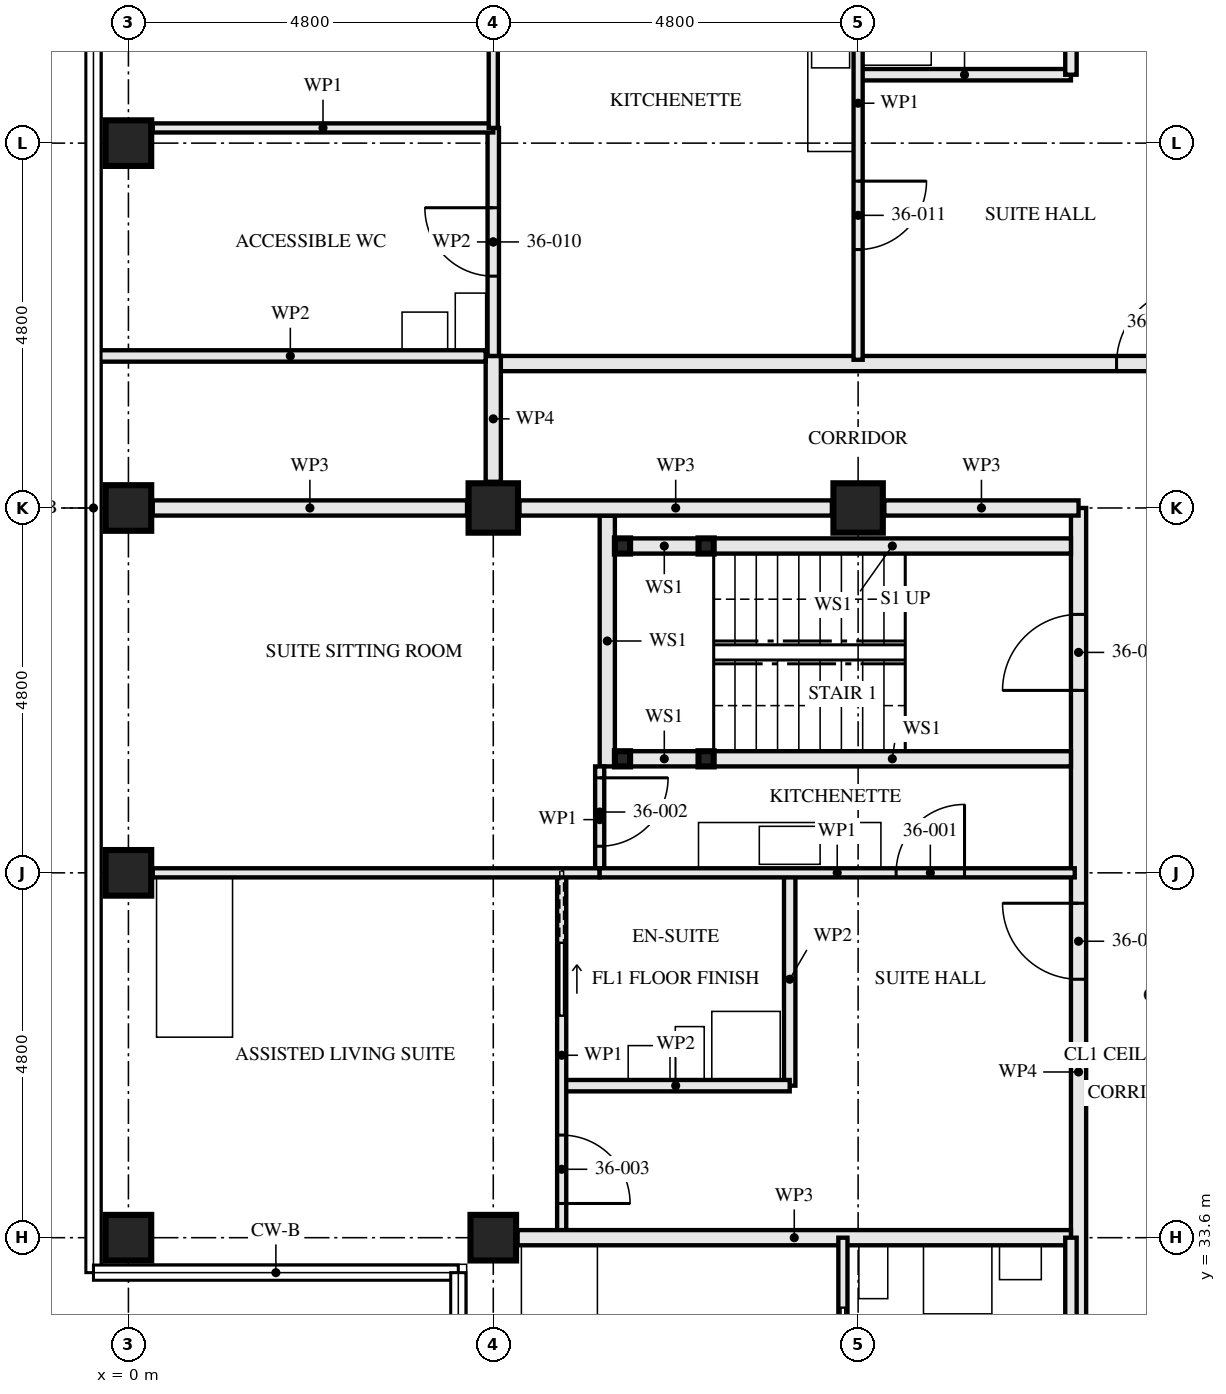
"""IFC4 building model, lengths in metres.
Left out: names, types, materials, properties, quantities, classifications, styles, units other than length and angle.
Written with IfcOpenShell. Run it as: python <this file> out.ifc"""

import sys

from ifc_helpers import new_model, si_unit, direction, frame, frame_2d, origin, origin_2d, place, context, subcontext, project, spatial, rectangle, hollow_rectangle, extrude, element, fill, save


model = new_model("IFC4")
c1 = context("Model", 3, precision=1e-05, world=origin(), true_north=direction((0.0, 1.0)))
c2 = subcontext(c1, "Body", "Model", "MODEL_VIEW")
j1 = project(units=[si_unit("LENGTHUNIT", "METRE"), si_unit("PLANEANGLEUNIT", "RADIAN")], contexts=[c1])
p1 = place(None, origin())
s1 = spatial("IfcSite", under=j1, at=p1, CompositionType="ELEMENT")
p2 = place(p1, origin())
s2 = spatial("IfcBuilding", under=s1, at=p2, CompositionType="ELEMENT")
p3 = place(p2, frame((0.0, 0.0, 133.0)))
s3 = spatial("IfcBuildingStorey", under=s2, at=p3, CompositionType="ELEMENT", Elevation=133.0)
for number, where, z_axis, x_axis in (
    (1, (0.0, 33.6, 0.0), (0.0, 0.0, 1.0), (0.0, 1.0, 0.0)),
    (2, (0.0, 38.4, 0.0), (0.0, 0.0, 1.0), (1.0, 0.0, 0.0)),
    (3, (0.0, 43.2, 0.0), (0.0, 0.0, 1.0), (0.0, 1.0, 0.0)),
    (4, (0.0, 48.0, 0.0), (0.0, 0.0, 1.0), (1.0, 0.0, 0.0)),
    (5, (4.8, 33.6, 0.0), (0.0, 0.0, 1.0), (0.0, 1.0, 0.0)),
):
    element("IfcColumn", number, at=place(p3, frame(where, z_axis=z_axis, x_axis=x_axis)), inside=s3, PredefinedType="COLUMN", context=c2, shape_type="SweptSolid", body=[
        extrude(hollow_rectangle(XDim=0.6, YDim=0.6, WallThickness=0.08, at=origin_2d()), origin(), (0.0, 0.0, 1.0), 3.5),
    ])
for number, where, z_axis, x_axis in (
    (6, (4.8, 43.2, 0.0), (0.0, 0.0, 1.0), (0.0, 1.0, 0.0)),
    (7, (9.6, 43.2, 0.0), (0.0, 0.0, 1.0), (0.0, 1.0, 0.0)),
):
    element("IfcColumn", number, at=place(p3, frame(where, z_axis=z_axis, x_axis=x_axis)), inside=s3, PredefinedType="COLUMN", context=c2, shape_type="SweptSolid", body=[
        extrude(hollow_rectangle(XDim=0.65, YDim=0.65, WallThickness=0.05, at=origin_2d()), origin(), (0.0, 0.0, 1.0), 3.5),
    ])
for number, where, z_axis, x_axis in (
    (8, (6.5, 42.7, 0.0), (0.0, 0.0, 1.0), (1.0, 0.0, 0.0)),
    (9, (6.5, 39.9, 0.0), (0.0, 0.0, 1.0), (1.0, 0.0, 0.0)),
    (10, (7.6, 42.7, 0.0), (0.0, 0.0, 1.0), (1.0, 0.0, 0.0)),
    (11, (7.6, 39.9, 0.0), (0.0, 0.0, 1.0), (1.0, 0.0, 0.0)),
):
    element("IfcColumn", number, at=place(p3, frame(where, z_axis=z_axis, x_axis=x_axis)), inside=s3, PredefinedType="COLUMN", context=c2, shape_type="SweptSolid", body=[
        extrude(hollow_rectangle(XDim=0.2, YDim=0.2, WallThickness=0.008, at=origin_2d()), origin(), (0.0, 0.0, 1.0), 3.25),
    ])
p4 = place(p3, frame((6.6, 42.7, 0.0), z_axis=(0.0, 0.0, 1.0), x_axis=(1.0, 0.0, 0.0)))
e12 = element("IfcWall", 12, at=p4, inside=s3, PredefinedType="SOLIDWALL", context=c2, shape_type="SweptSolid", body=[
    extrude(rectangle(XDim=0.9, YDim=0.2, at=frame_2d((0.45, 0.0))), origin(), (0.0, 0.0, 1.0), 2.94),
])
p5 = place(p3, frame((7.7, 42.7, 0.0), z_axis=(0.0, 0.0, 1.0), x_axis=(1.0, 0.0, 0.0)))
e13 = element("IfcWall", 13, at=p5, inside=s3, PredefinedType="SOLIDWALL", context=c2, shape_type="SweptSolid", body=[
    extrude(rectangle(XDim=4.7, YDim=0.2, at=frame_2d((2.35, 0.0))), origin(), (0.0, 0.0, 1.0), 2.94),
])
p6 = place(p3, frame((6.6, 39.9, 0.0), z_axis=(0.0, 0.0, 1.0), x_axis=(1.0, 0.0, 0.0)))
e14 = element("IfcWall", 14, at=p6, inside=s3, PredefinedType="SOLIDWALL", context=c2, shape_type="SweptSolid", body=[
    extrude(rectangle(XDim=0.9, YDim=0.2, at=frame_2d((0.45, 0.0))), origin(), (0.0, 0.0, 1.0), 2.94),
])
p7 = place(p3, frame((7.7, 39.9, 0.0), z_axis=(0.0, 0.0, 1.0), x_axis=(1.0, 0.0, 0.0)))
e15 = element("IfcWall", 15, at=p7, inside=s3, PredefinedType="SOLIDWALL", context=c2, shape_type="SweptSolid", body=[
    extrude(rectangle(XDim=4.7, YDim=0.2, at=frame_2d((2.35, 0.0))), origin(), (0.0, 0.0, 1.0), 2.94),
])
p8 = place(p3, frame((6.3, 43.1, 0.0), z_axis=(0.0, 0.0, 1.0), x_axis=(0.0, -1.0, 0.0)))
e16 = element("IfcWall", 16, at=p8, inside=s3, PredefinedType="SOLIDWALL", context=c2, shape_type="SweptSolid", body=[
    extrude(rectangle(XDim=3.3, YDim=0.2, at=frame_2d((1.65, 0.0))), origin(), (0.0, 0.0, 1.0), 3.25),
])
p9 = place(p3, frame((5.7, 35.6, 0.0), z_axis=(0.0, 0.0, 1.0), x_axis=(1.0, 0.0, 0.0)))
e17 = element("IfcWall", 17, at=p9, inside=s3, PredefinedType="PARTITIONING", context=c2, shape_type="SweptSolid", body=[
    extrude(rectangle(XDim=3.0, YDim=0.15, at=frame_2d((1.5, 0.0))), origin(), (0.0, 0.0, 1.0), 3.25),
])
p10 = place(p3, frame((8.7, 38.4, 0.0), z_axis=(0.0, 0.0, 1.0), x_axis=(0.0, -1.0, 0.0)))
e18 = element("IfcWall", 18, at=p10, inside=s3, PredefinedType="PARTITIONING", context=c2, shape_type="SweptSolid", body=[
    extrude(rectangle(XDim=2.8, YDim=0.15, at=frame_2d((1.4, 0.0))), origin(), (0.0, 0.0, 1.0), 3.25),
])
p11 = place(p3, frame((6.2, 38.4, 0.0), z_axis=(0.0, 0.0, 1.0), x_axis=(1.0, 0.0, 0.0)))
e19 = element("IfcWall", 19, at=p11, inside=s3, PredefinedType="PARTITIONING", context=c2, shape_type="SweptSolid", body=[
    extrude(rectangle(XDim=6.25, YDim=0.12, at=frame_2d((3.125, 0.0))), origin(), (0.0, 0.0, 1.0), 2.04),
])
p12 = place(p11, frame((3.9, 0.0, 0.0)))
e20 = element("IfcOpeningElement", 20, at=p12, cuts=e19, PredefinedType="OPENING", context=c2, shape_type="SweptSolid", body=[
    extrude(rectangle(XDim=0.9, YDim=2.0, at=frame_2d((0.45, 1.0))), frame((0.0, 0.071, 0.0), z_axis=(0.0, -1.0, 0.0), x_axis=(1.0, 0.0, 0.0)), (0.0, 0.0, 1.0), 0.141),
])
p13 = place(p3, frame((6.2, 39.8, 0.0), z_axis=(0.0, 0.0, 1.0), x_axis=(0.0, -1.0, 0.0)))
e21 = element("IfcWall", 21, at=p13, inside=s3, PredefinedType="PARTITIONING", context=c2, shape_type="SweptSolid", body=[
    extrude(rectangle(XDim=1.4, YDim=0.12, at=frame_2d((0.7, 0.0))), origin(), (0.0, 0.0, 1.0), 3.25),
])
p14 = place(p13, frame((0.15, 0.0, 0.0)))
e22 = element("IfcOpeningElement", 22, at=p14, cuts=e21, PredefinedType="OPENING", context=c2, shape_type="SweptSolid", body=[
    extrude(rectangle(XDim=0.9, YDim=2.1, at=frame_2d((0.45, 1.05))), frame((0.0, 0.071, 0.0), z_axis=(0.0, -1.0, 0.0), x_axis=(1.0, 0.0, 0.0)), (0.0, 0.0, 1.0), 0.141),
])
p15 = place(p3, frame((5.7, 38.4, 0.0), z_axis=(0.0, 0.0, 1.0), x_axis=(0.0, -1.0, 0.0)))
e23 = element("IfcWall", 23, at=p15, inside=s3, PredefinedType="PARTITIONING", context=c2, shape_type="SweptSolid", body=[
    extrude(rectangle(XDim=4.8, YDim=0.12, at=frame_2d((2.4, 0.0))), origin(), (0.0, 0.0, 1.0), 3.25),
])
p16 = place(p15, frame((3.45, 0.0, 0.0)))
e24 = element("IfcOpeningElement", 24, at=p16, cuts=e23, PredefinedType="OPENING", context=c2, shape_type="SweptSolid", body=[
    extrude(rectangle(XDim=0.9, YDim=2.1, at=frame_2d((0.45, 1.05))), frame((0.0, 0.071, 0.0), z_axis=(0.0, -1.0, 0.0), x_axis=(1.0, 0.0, 0.0)), (0.0, 0.0, 1.0), 0.141),
])
p17 = place(p15, frame((0.925, 0.0, 0.0)))
e25 = element("IfcOpeningElement", 25, at=p17, cuts=e23, PredefinedType="OPENING", context=c2, shape_type="SweptSolid", body=[
    extrude(rectangle(XDim=0.95, YDim=2.1, at=frame_2d((0.475, 1.05))), frame((0.0, 0.071, 0.0), z_axis=(0.0, -1.0, 0.0), x_axis=(1.0, 0.0, 0.0)), (0.0, 0.0, 1.0), 0.141),
])
p18 = place(p3, frame((0.32, 38.4, 0.0), z_axis=(0.0, 0.0, 1.0), x_axis=(1.0, 0.0, 0.0)))
e26 = element("IfcWall", 26, at=p18, inside=s3, PredefinedType="PARTITIONING", context=c2, shape_type="SweptSolid", body=[
    extrude(rectangle(XDim=5.88, YDim=0.12, at=frame_2d((2.94, 0.0))), origin(), (0.0, 0.0, 1.0), 2.04),
])
p19 = place(p3, frame((5.12, 33.6, 0.0), z_axis=(0.0, 0.0, 1.0), x_axis=(1.0, 0.0, 0.0)))
e27 = element("IfcWall", 27, at=p19, inside=s3, PredefinedType="PARTITIONING", context=c2, shape_type="SweptSolid", body=[
    extrude(rectangle(XDim=7.28, YDim=0.2, at=frame_2d((3.64, 0.0))), origin(), (0.0, 0.0, 1.0), 2.24),
])
p20 = place(p3, frame((12.4, 33.6, 0.0), z_axis=(0.0, 0.0, 1.0), x_axis=(0.0, -1.0, 0.0)))
e28 = element("IfcWall", 28, at=p20, inside=s3, PredefinedType="PARTITIONING", context=c2, shape_type="SweptSolid", body=[
    extrude(rectangle(XDim=2.8, YDim=0.15, at=frame_2d((1.4, 0.0))), origin(), (0.0, 0.0, 1.0), 3.25),
])
p21 = place(p3, frame((9.4, 33.6, 0.0), z_axis=(0.0, 0.0, 1.0), x_axis=(0.0, -1.0, 0.0)))
e29 = element("IfcWall", 29, at=p21, inside=s3, PredefinedType="PARTITIONING", context=c2, shape_type="SweptSolid", body=[
    extrude(rectangle(XDim=4.48, YDim=0.12, at=frame_2d((2.24, 0.0))), origin(), (0.0, 0.0, 1.0), 3.25),
])
p22 = place(p21, frame((2.975, 0.0, 0.0)))
e30 = element("IfcOpeningElement", 30, at=p22, cuts=e29, PredefinedType="OPENING", context=c2, shape_type="SweptSolid", body=[
    extrude(rectangle(XDim=0.9, YDim=2.1, at=frame_2d((0.45, 1.05))), frame((0.0, 0.071, 0.0), z_axis=(0.0, -1.0, 0.0), x_axis=(1.0, 0.0, 0.0)), (0.0, 0.0, 1.0), 0.141),
])
p23 = place(p21, frame((0.925, 0.0, 0.0)))
e31 = element("IfcOpeningElement", 31, at=p23, cuts=e29, PredefinedType="OPENING", context=c2, shape_type="SweptSolid", body=[
    extrude(rectangle(XDim=0.95, YDim=2.1, at=frame_2d((0.475, 1.05))), frame((0.0, 0.071, 0.0), z_axis=(0.0, -1.0, 0.0), x_axis=(1.0, 0.0, 0.0)), (0.0, 0.0, 1.0), 0.141),
])
p24 = place(p3, frame((12.5, 43.2, 0.0), z_axis=(0.0, 0.0, 1.0), x_axis=(0.0, -1.0, 0.0)))
e32 = element("IfcWall", 32, at=p24, inside=s3, PredefinedType="PARTITIONING", context=c2, shape_type="SweptSolid", body=[
    extrude(rectangle(XDim=14.84, YDim=0.2, at=frame_2d((7.42, 0.0))), origin(), (0.0, 0.0, 1.0), 2.04),
])
p25 = place(p24, frame((1.4, 0.0, 0.0)))
e33 = element("IfcOpeningElement", 33, at=p25, cuts=e32, PredefinedType="OPENING", context=c2, shape_type="SweptSolid", body=[
    extrude(rectangle(XDim=1.0, YDim=2.0, at=frame_2d((0.5, 1.0))), frame((0.0, 0.111, 0.0), z_axis=(0.0, -1.0, 0.0), x_axis=(1.0, 0.0, 0.0)), (0.0, 0.0, 1.0), 0.221),
])
p26 = place(p24, frame((5.2, 0.0, 0.0)))
e34 = element("IfcOpeningElement", 34, at=p26, cuts=e32, PredefinedType="OPENING", context=c2, shape_type="SweptSolid", body=[
    extrude(rectangle(XDim=1.0, YDim=2.0, at=frame_2d((0.5, 1.0))), frame((0.0, 0.111, 0.0), z_axis=(0.0, -1.0, 0.0), x_axis=(1.0, 0.0, 0.0)), (0.0, 0.0, 1.0), 0.221),
])
p27 = place(p24, frame((13.0, 0.0, 0.0)))
e35 = element("IfcOpeningElement", 35, at=p27, cuts=e32, PredefinedType="OPENING", context=c2, shape_type="SweptSolid", body=[
    extrude(rectangle(XDim=1.0, YDim=2.0, at=frame_2d((0.5, 1.0))), frame((0.0, 0.111, 0.0), z_axis=(0.0, -1.0, 0.0), x_axis=(1.0, 0.0, 0.0)), (0.0, 0.0, 1.0), 0.221),
])
p28 = place(p3, frame((12.4, 51.9, 0.0), z_axis=(0.0, 0.0, 1.0), x_axis=(0.0, -1.0, 0.0)))
e36 = element("IfcWall", 36, at=p28, inside=s3, PredefinedType="PARTITIONING", context=c2, shape_type="SweptSolid", body=[
    extrude(rectangle(XDim=3.0, YDim=0.15, at=frame_2d((1.5, 0.0))), origin(), (0.0, 0.0, 1.0), 3.25),
])
p29 = place(p3, frame((12.4, 48.9, 0.0), z_axis=(0.0, 0.0, 1.0), x_axis=(-1.0, 0.0, 0.0)))
e37 = element("IfcWall", 37, at=p29, inside=s3, PredefinedType="PARTITIONING", context=c2, shape_type="SweptSolid", body=[
    extrude(rectangle(XDim=2.8, YDim=0.15, at=frame_2d((1.4, 0.0))), origin(), (0.0, 0.0, 1.0), 3.25),
])
p30 = place(p3, frame((4.8, 48.2, 0.0), z_axis=(0.0, 0.0, 1.0), x_axis=(0.0, -1.0, 0.0)))
e38 = element("IfcWall", 38, at=p30, inside=s3, PredefinedType="PARTITIONING", context=c2, shape_type="SweptSolid", body=[
    extrude(rectangle(XDim=3.0, YDim=0.15, at=frame_2d((1.5, 0.0))), origin(), (0.0, 0.0, 1.0), 2.04),
])
p31 = place(p30, frame((1.05, 0.0, 0.0)))
e39 = element("IfcOpeningElement", 39, at=p31, cuts=e38, PredefinedType="OPENING", context=c2, shape_type="SweptSolid", body=[
    extrude(rectangle(XDim=0.9, YDim=2.0, at=frame_2d((0.45, 1.0))), frame((0.0, 0.085, 0.0), z_axis=(0.0, -1.0, 0.0), x_axis=(1.0, 0.0, 0.0)), (0.0, 0.0, 1.0), 0.171),
])
p32 = place(p3, frame((9.6, 51.9, 0.0), z_axis=(0.0, 0.0, 1.0), x_axis=(0.0, -1.0, 0.0)))
e40 = element("IfcWall", 40, at=p32, inside=s3, PredefinedType="PARTITIONING", context=c2, shape_type="SweptSolid", body=[
    extrude(rectangle(XDim=6.75, YDim=0.12, at=frame_2d((3.375, 0.0))), origin(), (0.0, 0.0, 1.0), 2.04),
])
p33 = place(p32, frame((4.4, 0.0, 0.0)))
e41 = element("IfcOpeningElement", 41, at=p33, cuts=e40, PredefinedType="OPENING", context=c2, shape_type="SweptSolid", body=[
    extrude(rectangle(XDim=0.9, YDim=2.0, at=frame_2d((0.45, 1.0))), frame((0.0, 0.071, 0.0), z_axis=(0.0, -1.0, 0.0), x_axis=(1.0, 0.0, 0.0)), (0.0, 0.0, 1.0), 0.141),
])
p34 = place(p3, frame((4.8, 48.2, 0.0), z_axis=(0.0, 0.0, 1.0), x_axis=(-1.0, 0.0, 0.0)))
e42 = element("IfcWall", 42, at=p34, inside=s3, PredefinedType="PARTITIONING", context=c2, shape_type="SweptSolid", body=[
    extrude(rectangle(XDim=4.48, YDim=0.12, at=frame_2d((2.24, 0.0))), origin(), (0.0, 0.0, 1.0), 2.04),
])
p35 = place(p3, frame((4.8, 51.9, 0.0), z_axis=(0.0, 0.0, 1.0), x_axis=(0.0, -1.0, 0.0)))
e43 = element("IfcWall", 43, at=p35, inside=s3, PredefinedType="PARTITIONING", context=c2, shape_type="SweptSolid", body=[
    extrude(rectangle(XDim=3.7, YDim=0.12, at=frame_2d((1.85, 0.0))), origin(), (0.0, 0.0, 1.0), 3.25),
])
p36 = place(p3, frame((14.4, 45.1, 0.0), z_axis=(0.0, 0.0, 1.0), x_axis=(-1.0, 0.0, 0.0)))
e44 = element("IfcWall", 44, at=p36, inside=s3, PredefinedType="PARTITIONING", context=c2, shape_type="SweptSolid", body=[
    extrude(rectangle(XDim=9.6, YDim=0.2, at=frame_2d((4.8, 0.0))), origin(), (0.0, 0.0, 1.0), 3.25),
])
p37 = place(p36, frame((0.4, 0.0, 0.0)))
e45 = element("IfcOpeningElement", 45, at=p37, cuts=e44, PredefinedType="OPENING", context=c2, shape_type="SweptSolid", body=[
    extrude(rectangle(XDim=1.0, YDim=2.1, at=frame_2d((0.5, 1.05))), frame((0.0, 0.111, 0.0), z_axis=(0.0, -1.0, 0.0), x_axis=(1.0, 0.0, 0.0)), (0.0, 0.0, 1.0), 0.221),
])
p38 = place(p3, frame((4.8, 45.2, 0.0), z_axis=(0.0, 0.0, 1.0), x_axis=(0.0, -1.0, 0.0)))
e46 = element("IfcWall", 46, at=p38, inside=s3, PredefinedType="PARTITIONING", context=c2, shape_type="SweptSolid", body=[
    extrude(rectangle(XDim=1.655, YDim=0.2, at=frame_2d((0.828, 0.0))), origin(), (0.0, 0.0, 1.0), 3.25),
])
p39 = place(p3, frame((12.5, 43.2, 0.0), z_axis=(0.0, 0.0, 1.0), x_axis=(-1.0, 0.0, 0.0)))
e47 = element("IfcWall", 47, at=p39, inside=s3, PredefinedType="PARTITIONING", context=c2, shape_type="SweptSolid", body=[
    extrude(rectangle(XDim=2.555, YDim=0.2, at=frame_2d((1.277, 0.0))), origin(), (0.0, 0.0, 1.0), 2.04),
])
p40 = place(p3, frame((9.255, 43.2, 0.0), z_axis=(0.0, 0.0, 1.0), x_axis=(-1.0, 0.0, 0.0)))
e48 = element("IfcWall", 48, at=p40, inside=s3, PredefinedType="PARTITIONING", context=c2, shape_type="SweptSolid", body=[
    extrude(rectangle(XDim=4.11, YDim=0.2, at=frame_2d((2.055, 0.0))), origin(), (0.0, 0.0, 1.0), 2.04),
])
p41 = place(p3, frame((4.455, 43.2, 0.0), z_axis=(0.0, 0.0, 1.0), x_axis=(-1.0, 0.0, 0.0)))
e49 = element("IfcWall", 49, at=p41, inside=s3, PredefinedType="PARTITIONING", context=c2, shape_type="SweptSolid", body=[
    extrude(rectangle(XDim=4.135, YDim=0.2, at=frame_2d((2.067, 0.0))), origin(), (0.0, 0.0, 1.0), 2.04),
])
p42 = place(p3, frame((4.7, 45.2, 0.0), z_axis=(0.0, 0.0, 1.0), x_axis=(-1.0, 0.0, 0.0)))
e50 = element("IfcWall", 50, at=p42, inside=s3, PredefinedType="PARTITIONING", context=c2, shape_type="SweptSolid", body=[
    extrude(rectangle(XDim=5.14, YDim=0.15, at=frame_2d((2.57, 0.0))), origin(), (0.0, 0.0, 1.0), 2.04),
])
p43 = place(p12, origin())
e51 = element("IfcDoor", 51, at=p43, inside=s3, OperationType="SINGLE_SWING_LEFT", PredefinedType="DOOR", context=c2, shape_type="SweptSolid", body=[
    extrude(rectangle(XDim=0.9, YDim=2.0, at=frame_2d((0.45, 1.0))), frame((0.0, 0.022, 0.0), z_axis=(0.0, -1.0, 0.0), x_axis=(1.0, 0.0, 0.0)), (0.0, 0.0, 1.0), 0.044),
])
fill(e20, e51)
p44 = place(p14, origin())
e52 = element("IfcDoor", 52, at=p44, inside=s3, OperationType="SINGLE_SWING_RIGHT", PredefinedType="DOOR", context=c2, shape_type="SweptSolid", body=[
    extrude(rectangle(XDim=0.9, YDim=2.1, at=frame_2d((0.45, 1.05))), frame((0.0, 0.022, 0.0), z_axis=(0.0, -1.0, 0.0), x_axis=(1.0, 0.0, 0.0)), (0.0, 0.0, 1.0), 0.044),
])
fill(e22, e52)
p45 = place(p16, origin())
e53 = element("IfcDoor", 53, at=p45, inside=s3, OperationType="SINGLE_SWING_LEFT", PredefinedType="DOOR", context=c2, shape_type="SweptSolid", body=[
    extrude(rectangle(XDim=0.9, YDim=2.1, at=frame_2d((0.45, 1.05))), frame((0.0, 0.022, 0.0), z_axis=(0.0, -1.0, 0.0), x_axis=(1.0, 0.0, 0.0)), (0.0, 0.0, 1.0), 0.044),
])
fill(e24, e53)
p46 = place(p17, origin())
e54 = element("IfcDoor", 54, at=p46, inside=s3, OperationType="SLIDING_TO_RIGHT", PredefinedType="DOOR", context=c2, shape_type="SweptSolid", body=[
    extrude(rectangle(XDim=0.95, YDim=2.1, at=frame_2d((0.475, 1.05))), frame((0.0, 0.022, 0.0), z_axis=(0.0, -1.0, 0.0), x_axis=(1.0, 0.0, 0.0)), (0.0, 0.0, 1.0), 0.044),
])
fill(e25, e54)
p47 = place(p23, origin())
e55 = element("IfcDoor", 55, at=p47, inside=s3, OperationType="SLIDING_TO_LEFT", PredefinedType="DOOR", context=c2, shape_type="SweptSolid", body=[
    extrude(rectangle(XDim=0.95, YDim=2.1, at=frame_2d((0.475, 1.05))), frame((0.0, 0.022, 0.0), z_axis=(0.0, -1.0, 0.0), x_axis=(1.0, 0.0, 0.0)), (0.0, 0.0, 1.0), 0.044),
])
fill(e31, e55)
p48 = place(p25, frame((1.0, 0.0, 0.0), z_axis=(0.0, 0.0, 1.0), x_axis=(-1.0, 0.0, 0.0)))
e56 = element("IfcDoor", 56, at=p48, inside=s3, OperationType="SINGLE_SWING_RIGHT", PredefinedType="DOOR", context=c2, shape_type="SweptSolid", body=[
    extrude(rectangle(XDim=1.0, YDim=2.0, at=frame_2d((0.5, 1.0))), frame((0.0, 0.032, 0.0), z_axis=(0.0, -1.0, 0.0), x_axis=(1.0, 0.0, 0.0)), (0.0, 0.0, 1.0), 0.064),
])
fill(e33, e56)
p49 = place(p26, frame((1.0, 0.0, 0.0), z_axis=(0.0, 0.0, 1.0), x_axis=(-1.0, 0.0, 0.0)))
e57 = element("IfcDoor", 57, at=p49, inside=s3, OperationType="SINGLE_SWING_LEFT", PredefinedType="DOOR", context=c2, shape_type="SweptSolid", body=[
    extrude(rectangle(XDim=1.0, YDim=2.0, at=frame_2d((0.5, 1.0))), frame((0.0, 0.027, 0.0), z_axis=(0.0, -1.0, 0.0), x_axis=(1.0, 0.0, 0.0)), (0.0, 0.0, 1.0), 0.054),
])
fill(e34, e57)
p50 = place(p31, frame((0.9, 0.0, 0.0), z_axis=(0.0, 0.0, 1.0), x_axis=(-1.0, 0.0, 0.0)))
e58 = element("IfcDoor", 58, at=p50, inside=s3, OperationType="SINGLE_SWING_LEFT", PredefinedType="DOOR", context=c2, shape_type="SweptSolid", body=[
    extrude(rectangle(XDim=0.9, YDim=2.0, at=frame_2d((0.45, 1.0))), frame((0.0, 0.022, 0.0), z_axis=(0.0, -1.0, 0.0), x_axis=(1.0, 0.0, 0.0)), (0.0, 0.0, 1.0), 0.044),
])
fill(e39, e58)
p51 = place(p33, origin())
e59 = element("IfcDoor", 59, at=p51, inside=s3, OperationType="SINGLE_SWING_RIGHT", PredefinedType="DOOR", context=c2, shape_type="SweptSolid", body=[
    extrude(rectangle(XDim=0.9, YDim=2.0, at=frame_2d((0.45, 1.0))), frame((0.0, 0.022, 0.0), z_axis=(0.0, -1.0, 0.0), x_axis=(1.0, 0.0, 0.0)), (0.0, 0.0, 1.0), 0.044),
])
fill(e41, e59)
p52 = place(p37, frame((1.0, 0.0, 0.0), z_axis=(0.0, 0.0, 1.0), x_axis=(-1.0, 0.0, 0.0)))
e60 = element("IfcDoor", 60, at=p52, inside=s3, OperationType="SINGLE_SWING_LEFT", PredefinedType="DOOR", context=c2, shape_type="SweptSolid", body=[
    extrude(rectangle(XDim=1.0, YDim=2.1, at=frame_2d((0.5, 1.05))), frame((0.0, 0.027, 0.0), z_axis=(0.0, -1.0, 0.0), x_axis=(1.0, 0.0, 0.0)), (0.0, 0.0, 1.0), 0.054),
])
fill(e45, e60)
save(model, sys.argv[1])
